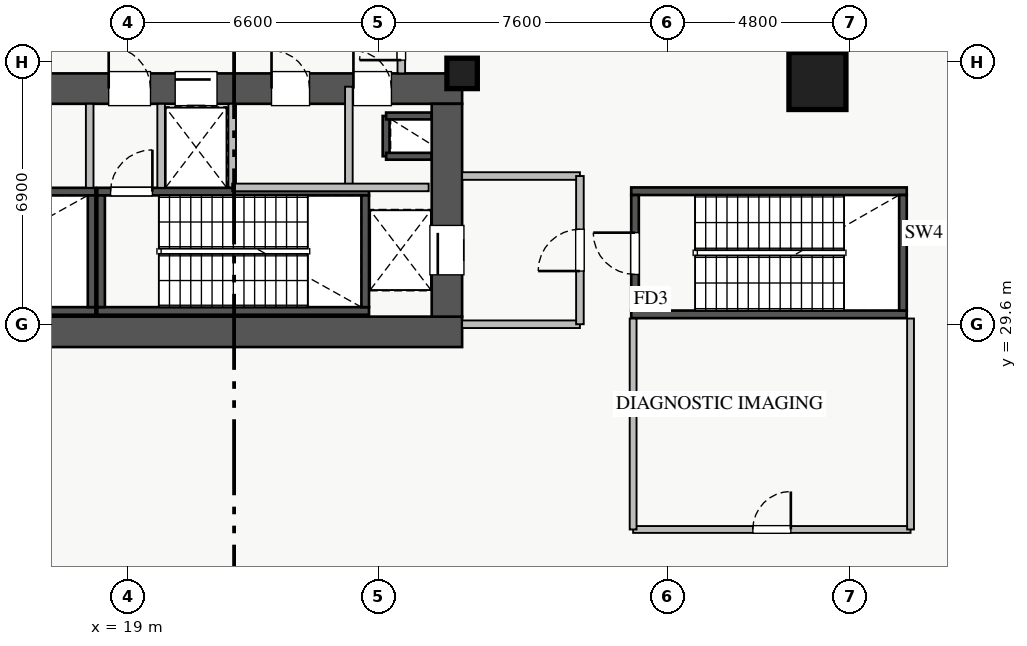
"""IFC4 building model, lengths in metres.
Left out: names, types, materials, properties, quantities, classifications, styles, units other than length and angle.
Written with IfcOpenShell. Run it as: python <this file> out.ifc"""

import sys

from ifc_helpers import new_model, si_unit, direction, frame, frame_2d, origin, origin_2d, place, context, subcontext, project, spatial, rectangle, extrude, source, transform, mapped, element, fill, save


model = new_model("IFC4")
c1 = context("Model", 3, precision=1e-05, world=origin(), true_north=direction((0.0, 1.0)))
c2 = subcontext(c1, "Body", "Model", "MODEL_VIEW")
j1 = project(units=[si_unit("LENGTHUNIT", "METRE"), si_unit("PLANEANGLEUNIT", "RADIAN")], contexts=[c1])
p1 = place(None, origin())
s1 = spatial("IfcSite", under=j1, at=p1, CompositionType="ELEMENT")
p2 = place(p1, origin())
s2 = spatial("IfcBuilding", under=s1, at=p2, CompositionType="ELEMENT")
p3 = place(p2, origin())
s3 = spatial("IfcBuildingStorey", under=s2, at=p3, CompositionType="ELEMENT", Elevation=0.0)
p4 = place(p3, frame((25.8, 34.02, 0.0), z_axis=(0.0, 0.0, 1.0), x_axis=(0.0, 1.0, 0.0)))
e1 = element("IfcWall", 1, at=p4, inside=s3, PredefinedType="SHEAR", context=c2, shape_type="SweptSolid", body=[
    extrude(rectangle(XDim=1.06, YDim=0.18, at=frame_2d((0.53, 0.0))), origin(), (0.0, 0.0, 1.0), 4.78),
])
for number, where, z_axis, x_axis in (
    (2, (25.8, 35.08, 0.0), (0.0, 0.0, 1.0), (1.0, 0.0, 0.0)),
    (3, (25.8, 34.02, 0.0), (0.0, 0.0, 1.0), (1.0, 0.0, 0.0)),
):
    element("IfcWall", number, at=place(p3, frame(where, z_axis=z_axis, x_axis=x_axis)), inside=s3, PredefinedType="SHEAR", context=c2, shape_type="SweptSolid", body=[
        extrude(rectangle(XDim=1.2, YDim=0.18, at=frame_2d((0.6, 0.0))), origin(), (0.0, 0.0, 1.0), 4.78),
    ])
p5 = place(p3, frame((19.88, 33.2, 0.0), z_axis=(0.0, 0.0, 1.0), x_axis=(1.0, 0.0, 0.0)))
e4 = element("IfcWall", 4, at=p5, inside=s3, PredefinedType="SHEAR", context=c2, shape_type="SweptSolid", body=[
    extrude(rectangle(XDim=1.87, YDim=0.18, at=frame_2d((0.935, 0.0))), origin(), (0.0, 0.0, 1.0), 4.78),
])
p6 = place(p3, frame((11.0, 29.95, 0.0), z_axis=(0.0, 0.0, 1.0), x_axis=(1.0, 0.0, 0.0)))
e5 = element("IfcWall", 5, at=p6, inside=s3, PredefinedType="SHEAR", context=c2, shape_type="SweptSolid", body=[
    extrude(rectangle(XDim=7.15, YDim=0.2, at=frame_2d((3.575, 0.0))), origin(), (0.0, 0.0, 1.0), 5.0),
])
p7 = place(p3, frame((11.0, 33.09, 0.0), z_axis=(0.0, 0.0, 1.0), x_axis=(1.0, 0.0, 0.0)))
e6 = element("IfcWall", 6, at=p7, inside=s3, PredefinedType="SHEAR", context=c2, shape_type="SweptSolid", body=[
    extrude(rectangle(XDim=7.15, YDim=0.2, at=frame_2d((3.575, 0.0))), origin(), (0.0, 0.0, 1.0), 5.0),
])
p8 = place(p7, frame((0.35, 0.0, 0.0)))
e7 = element("IfcOpeningElement", 7, at=p8, cuts=e6, PredefinedType="OPENING", context=c2, shape_type="SweptSolid", body=[
    extrude(rectangle(XDim=1.1, YDim=2.05, at=frame_2d((0.55, 1.025))), frame((0.0, 0.11, 0.0), z_axis=(0.0, -1.0, 0.0), x_axis=(1.0, 0.0, 0.0)), (0.0, 0.0, 1.0), 0.22),
])
p9 = place(p3, frame((18.05, 30.05, 0.0), z_axis=(0.0, 0.0, 1.0), x_axis=(0.0, 1.0, 0.0)))
e8 = element("IfcWall", 8, at=p9, inside=s3, PredefinedType="SHEAR", context=c2, shape_type="SweptSolid", body=[
    extrude(rectangle(XDim=2.94, YDim=0.2, at=frame_2d((1.47, 0.0))), origin(), (0.0, 0.0, 1.0), 5.0),
])
p10 = place(p3, frame((18.2, 29.95, 0.0), z_axis=(0.0, 0.0, 1.0), x_axis=(1.0, 0.0, 0.0)))
e9 = element("IfcWall", 9, at=p10, inside=s3, PredefinedType="SHEAR", context=c2, shape_type="SweptSolid", body=[
    extrude(rectangle(XDim=7.15, YDim=0.2, at=frame_2d((3.575, 0.0))), origin(), (0.0, 0.0, 1.0), 5.0),
])
p11 = place(p3, frame((18.2, 33.09, 0.0), z_axis=(0.0, 0.0, 1.0), x_axis=(1.0, 0.0, 0.0)))
e10 = element("IfcWall", 10, at=p11, inside=s3, PredefinedType="SHEAR", context=c2, shape_type="SweptSolid", body=[
    extrude(rectangle(XDim=7.15, YDim=0.2, at=frame_2d((3.575, 0.0))), origin(), (0.0, 0.0, 1.0), 5.0),
])
p12 = place(p11, frame((0.35, 0.0, 0.0)))
e11 = element("IfcOpeningElement", 11, at=p12, cuts=e10, PredefinedType="OPENING", context=c2, shape_type="SweptSolid", body=[
    extrude(rectangle(XDim=1.1, YDim=2.05, at=frame_2d((0.55, 1.025))), frame((0.0, 0.11, 0.0), z_axis=(0.0, -1.0, 0.0), x_axis=(1.0, 0.0, 0.0)), (0.0, 0.0, 1.0), 0.22),
])
for number, where, z_axis, x_axis in (
    (12, (18.3, 30.05, 0.0), (0.0, 0.0, 1.0), (0.0, 1.0, 0.0)),
    (13, (25.25, 30.05, 0.0), (0.0, 0.0, 1.0), (0.0, 1.0, 0.0)),
):
    element("IfcWall", number, at=place(p3, frame(where, z_axis=z_axis, x_axis=x_axis)), inside=s3, PredefinedType="SHEAR", context=c2, shape_type="SweptSolid", body=[
        extrude(rectangle(XDim=2.94, YDim=0.2, at=frame_2d((1.47, 0.0))), origin(), (0.0, 0.0, 1.0), 5.0),
    ])
for number, where, z_axis, x_axis in (
    (14, (32.25, 29.86, 0.0), (0.0, 0.0, 1.0), (1.0, 0.0, 0.0)),
    (15, (32.25, 33.1, 0.0), (0.0, 0.0, 1.0), (1.0, 0.0, 0.0)),
):
    element("IfcWall", number, at=place(p3, frame(where, z_axis=z_axis, x_axis=x_axis)), inside=s3, PredefinedType="SHEAR", context=c2, shape_type="SweptSolid", body=[
        extrude(rectangle(XDim=7.25, YDim=0.2, at=frame_2d((3.625, 0.0))), origin(), (0.0, 0.0, 1.0), 5.0),
    ])
p13 = place(p3, frame((32.35, 29.96, 0.0), z_axis=(0.0, 0.0, 1.0), x_axis=(0.0, 1.0, 0.0)))
e16 = element("IfcWall", 16, at=p13, inside=s3, PredefinedType="SHEAR", context=c2, shape_type="SweptSolid", body=[
    extrude(rectangle(XDim=3.04, YDim=0.2, at=frame_2d((1.52, 0.0))), origin(), (0.0, 0.0, 1.0), 5.0),
])
p14 = place(p13, frame((0.95, 0.0, 0.0)))
e17 = element("IfcOpeningElement", 17, at=p14, cuts=e16, PredefinedType="OPENING", context=c2, shape_type="SweptSolid", body=[
    extrude(rectangle(XDim=1.1, YDim=2.05, at=frame_2d((0.55, 1.025))), frame((0.0, 0.11, 0.0), z_axis=(0.0, -1.0, 0.0), x_axis=(1.0, 0.0, 0.0)), (0.0, 0.0, 1.0), 0.22),
])
p15 = place(p3, frame((39.4, 29.96, 0.0), z_axis=(0.0, 0.0, 1.0), x_axis=(0.0, 1.0, 0.0)))
e18 = element("IfcWall", 18, at=p15, inside=s3, PredefinedType="SHEAR", context=c2, shape_type="SweptSolid", body=[
    extrude(rectangle(XDim=3.04, YDim=0.2, at=frame_2d((1.52, 0.0))), origin(), (0.0, 0.0, 1.0), 5.0),
])
p16 = place(p3, frame((10.2, 29.4, 0.0), z_axis=(0.0, 0.0, 1.0), x_axis=(1.0, 0.0, 0.0)))
e19 = element("IfcWall", 19, at=p16, inside=s3, PredefinedType="SHEAR", context=c2, shape_type="SweptSolid", body=[
    extrude(rectangle(XDim=17.6, YDim=0.8, at=frame_2d((8.8, 0.0))), origin(), (0.0, 0.0, 1.0), 5.0),
])
p17 = place(p3, frame((10.2, 35.8, 0.0), z_axis=(0.0, 0.0, 1.0), x_axis=(1.0, 0.0, 0.0)))
e20 = element("IfcWall", 20, at=p17, inside=s3, PredefinedType="SHEAR", context=c2, shape_type="SweptSolid", body=[
    extrude(rectangle(XDim=17.6, YDim=0.8, at=frame_2d((8.8, 0.0))), origin(), (0.0, 0.0, 1.0), 5.0),
])
p18 = place(p17, frame((1.15, 0.0, 0.0)))
e21 = element("IfcOpeningElement", 21, at=p18, cuts=e20, PredefinedType="OPENING", context=c2, shape_type="SweptSolid", body=[
    extrude(rectangle(XDim=1.1, YDim=2.05, at=frame_2d((0.55, 1.025))), frame((0.0, 0.41, 0.0), z_axis=(0.0, -1.0, 0.0), x_axis=(1.0, 0.0, 0.0)), (0.0, 0.0, 1.0), 0.82),
])
p19 = place(p17, frame((8.3, 0.0, 0.0)))
e22 = element("IfcOpeningElement", 22, at=p19, cuts=e20, PredefinedType="OPENING", context=c2, shape_type="SweptSolid", body=[
    extrude(rectangle(XDim=1.1, YDim=2.05, at=frame_2d((0.55, 1.025))), frame((0.0, 0.41, 0.0), z_axis=(0.0, -1.0, 0.0), x_axis=(1.0, 0.0, 0.0)), (0.0, 0.0, 1.0), 0.82),
])
p20 = place(p17, frame((10.05, 0.0, 0.0)))
e23 = element("IfcOpeningElement", 23, at=p20, cuts=e20, PredefinedType="OPENING", context=c2, shape_type="SweptSolid", body=[
    extrude(rectangle(XDim=1.1, YDim=2.05, at=frame_2d((0.55, 1.025))), frame((0.0, 0.41, 0.0), z_axis=(0.0, -1.0, 0.0), x_axis=(1.0, 0.0, 0.0)), (0.0, 0.0, 1.0), 0.82),
])
p21 = place(p17, frame((4.9, 0.0, 0.0)))
e24 = element("IfcOpeningElement", 24, at=p21, cuts=e20, PredefinedType="OPENING", context=c2, shape_type="SweptSolid", body=[
    extrude(rectangle(XDim=1.1, YDim=2.05, at=frame_2d((0.55, 1.025))), frame((0.0, 0.41, 0.0), z_axis=(0.0, -1.0, 0.0), x_axis=(1.0, 0.0, 0.0)), (0.0, 0.0, 1.0), 0.82),
])
p22 = place(p17, frame((2.85, 0.0, 0.0)))
e25 = element("IfcOpeningElement", 25, at=p22, cuts=e20, PredefinedType="OPENING", context=c2, shape_type="SweptSolid", body=[
    extrude(rectangle(XDim=1.1, YDim=2.05, at=frame_2d((0.55, 1.025))), frame((0.0, 0.41, 0.0), z_axis=(0.0, -1.0, 0.0), x_axis=(1.0, 0.0, 0.0)), (0.0, 0.0, 1.0), 0.82),
])
p23 = place(p17, frame((14.74, 0.0, 0.0)))
e26 = element("IfcOpeningElement", 26, at=p23, cuts=e20, PredefinedType="OPENING", context=c2, shape_type="SweptSolid", body=[
    extrude(rectangle(XDim=1.0, YDim=2.05, at=frame_2d((0.5, 1.025))), frame((0.0, 0.41, 0.0), z_axis=(0.0, -1.0, 0.0), x_axis=(1.0, 0.0, 0.0)), (0.0, 0.0, 1.0), 0.82),
])
p24 = place(p17, frame((12.585, 0.0, 0.0)))
e27 = element("IfcOpeningElement", 27, at=p24, cuts=e20, PredefinedType="OPENING", context=c2, shape_type="SweptSolid", body=[
    extrude(rectangle(XDim=1.0, YDim=2.05, at=frame_2d((0.5, 1.025))), frame((0.0, 0.41, 0.0), z_axis=(0.0, -1.0, 0.0), x_axis=(1.0, 0.0, 0.0)), (0.0, 0.0, 1.0), 0.82),
])
p25 = place(p3, frame((27.4, 29.8, 0.0), z_axis=(0.0, 0.0, 1.0), x_axis=(0.0, 1.0, 0.0)))
e28 = element("IfcWall", 28, at=p25, inside=s3, PredefinedType="SHEAR", context=c2, shape_type="SweptSolid", body=[
    extrude(rectangle(XDim=5.6, YDim=0.8, at=frame_2d((2.8, 0.0))), origin(), (0.0, 0.0, 1.0), 5.0),
])
p26 = place(p25, frame((1.1, 0.0, 0.0)))
e29 = element("IfcOpeningElement", 29, at=p26, cuts=e28, PredefinedType="OPENING", context=c2, shape_type="SweptSolid", body=[
    extrude(rectangle(XDim=1.3, YDim=2.05, at=frame_2d((0.65, 1.025))), frame((0.0, 0.41, 0.0), z_axis=(0.0, -1.0, 0.0), x_axis=(1.0, 0.0, 0.0)), (0.0, 0.0, 1.0), 0.82),
])
m1 = source(origin(), c2, "Body", "SweptSolid", [
    extrude(rectangle(XDim=1.5, YDim=1.5, at=origin_2d()), origin(), (0.0, 0.0, 1.0), 5.0),
])
p27 = place(p3, frame((37.15, 36.0, 0.0), z_axis=(0.0, 0.0, 1.0), x_axis=(1.0, 0.0, 0.0)))
e30 = element("IfcColumn", 30, at=p27, inside=s3, PredefinedType="COLUMN", context=c2, shape_type="MappedRepresentation", body=[
    mapped(m1, transform((0.0, 0.0, 0.0), x_axis=(1.0, 0.0, 0.0), y_axis=(0.0, 1.0, 0.0), z_axis=(0.0, 0.0, 1.0), scale=1.0)),
])
m2 = source(origin(), c2, "Body", "SweptSolid", [
    extrude(rectangle(XDim=0.8, YDim=0.8, at=origin_2d()), origin(), (0.0, 0.0, 1.0), 5.0),
])
p28 = place(p3, frame((27.8, 36.2, 0.0), z_axis=(0.0, 0.0, 1.0), x_axis=(1.0, 0.0, 0.0)))
e31 = element("IfcColumn", 31, at=p28, inside=s3, PredefinedType="PILASTER", context=c2, shape_type="MappedRepresentation", body=[
    mapped(m2, transform((0.0, 0.0, 0.0), x_axis=(1.0, 0.0, 0.0), y_axis=(0.0, 1.0, 0.0), z_axis=(0.0, 0.0, 1.0), scale=1.0)),
])
p29 = place(p3, frame((27.8, 29.6, 0.0), z_axis=(0.0, 0.0, 1.0), x_axis=(1.0, 0.0, 0.0)))
e32 = element("IfcWall", 32, at=p29, inside=s3, PredefinedType="PARTITIONING", context=c2, shape_type="SweptSolid", body=[
    extrude(rectangle(XDim=3.1, YDim=0.2, at=frame_2d((1.55, 0.0))), origin(), (0.0, 0.0, 1.0), 4.075),
])
p30 = place(p3, frame((27.8, 33.5, 0.0), z_axis=(0.0, 0.0, 1.0), x_axis=(1.0, 0.0, 0.0)))
e33 = element("IfcWall", 33, at=p30, inside=s3, PredefinedType="PARTITIONING", context=c2, shape_type="SweptSolid", body=[
    extrude(rectangle(XDim=3.1, YDim=0.2, at=frame_2d((1.55, 0.0))), origin(), (0.0, 0.0, 1.0), 3.775),
])
p31 = place(p3, frame((30.9, 29.6, 0.0), z_axis=(0.0, 0.0, 1.0), x_axis=(0.0, 1.0, 0.0)))
e34 = element("IfcWall", 34, at=p31, inside=s3, PredefinedType="PARTITIONING", context=c2, shape_type="SweptSolid", body=[
    extrude(rectangle(XDim=3.9, YDim=0.2, at=frame_2d((1.95, 0.0))), origin(), (0.0, 0.0, 1.0), 4.78),
])
p32 = place(p31, frame((1.4, 0.0, 0.0)))
e35 = element("IfcOpeningElement", 35, at=p32, cuts=e34, PredefinedType="OPENING", context=c2, shape_type="SweptSolid", body=[
    extrude(rectangle(XDim=1.1, YDim=2.05, at=frame_2d((0.55, 1.025))), frame((0.0, 0.11, 0.0), z_axis=(0.0, -1.0, 0.0), x_axis=(1.0, 0.0, 0.0)), (0.0, 0.0, 1.0), 0.22),
])
for number, where, z_axis, x_axis in (
    (36, (18.0, 33.19, 0.0), (0.0, 0.0, 1.0), (0.0, 1.0, 0.0)),
    (37, (19.88, 33.19, 0.0), (0.0, 0.0, 1.0), (0.0, 1.0, 0.0)),
):
    element("IfcWall", number, at=place(p3, frame(where, z_axis=z_axis, x_axis=x_axis)), inside=s3, PredefinedType="PARTITIONING", context=c2, shape_type="SweptSolid", body=[
        extrude(rectangle(XDim=2.21, YDim=0.2, at=frame_2d((1.105, 0.0))), origin(), (0.0, 0.0, 1.0), 4.78),
    ])
p33 = place(p3, frame((24.82, 33.2, 0.0), z_axis=(0.0, 0.0, 1.0), x_axis=(0.0, 1.0, 0.0)))
e38 = element("IfcWall", 38, at=p33, inside=s3, PredefinedType="PARTITIONING", context=c2, shape_type="SweptSolid", body=[
    extrude(rectangle(XDim=2.65, YDim=0.2, at=frame_2d((1.325, 0.0))), origin(), (0.0, 0.0, 1.0), 4.78),
])
p34 = place(p3, frame((21.75, 33.2, 0.0), z_axis=(0.0, 0.0, 1.0), x_axis=(0.0, 1.0, 0.0)))
e39 = element("IfcWall", 39, at=p34, inside=s3, PredefinedType="PARTITIONING", context=c2, shape_type="SweptSolid", body=[
    extrude(rectangle(XDim=2.2, YDim=0.2, at=frame_2d((1.1, 0.0))), origin(), (0.0, 0.0, 1.0), 4.78),
])
p35 = place(p3, frame((21.75, 33.2, 0.0), z_axis=(0.0, 0.0, 1.0), x_axis=(1.0, 0.0, 0.0)))
e40 = element("IfcWall", 40, at=p35, inside=s3, PredefinedType="PARTITIONING", context=c2, shape_type="SweptSolid", body=[
    extrude(rectangle(XDim=5.17, YDim=0.2, at=frame_2d((2.585, 0.0))), origin(), (0.0, 0.0, 1.0), 4.78),
])
p36 = place(p3, frame((26.2, 36.2, 0.0), z_axis=(0.0, 0.0, 1.0), x_axis=(0.0, 1.0, 0.0)))
e41 = element("IfcWall", 41, at=p36, inside=s3, PredefinedType="PARTITIONING", context=c2, shape_type="SweptSolid", body=[
    extrude(rectangle(XDim=2.0, YDim=0.2, at=frame_2d((1.0, 0.0))), origin(), (0.0, 0.0, 1.0), 4.78),
])
p37 = place(p36, frame((0.35, 0.0, 0.0)))
e42 = element("IfcOpeningElement", 42, at=p37, cuts=e41, PredefinedType="OPENING", context=c2, shape_type="SweptSolid", body=[
    extrude(rectangle(XDim=1.1, YDim=2.05, at=frame_2d((0.55, 1.025))), frame((0.0, 0.11, 0.0), z_axis=(0.0, -1.0, 0.0), x_axis=(1.0, 0.0, 0.0)), (0.0, 0.0, 1.0), 0.22),
])
p38 = place(p3, frame((32.3, 24.2, 0.0), z_axis=(0.0, 0.0, 1.0), x_axis=(1.0, 0.0, 0.0)))
e43 = element("IfcWall", 43, at=p38, inside=s3, PredefinedType="PARTITIONING", context=c2, shape_type="SweptSolid", body=[
    extrude(rectangle(XDim=7.3, YDim=0.18, at=frame_2d((3.65, 0.0))), origin(), (0.0, 0.0, 1.0), 4.78),
])
p39 = place(p38, frame((3.15, 0.0, 0.0)))
e44 = element("IfcOpeningElement", 44, at=p39, cuts=e43, PredefinedType="OPENING", context=c2, shape_type="SweptSolid", body=[
    extrude(rectangle(XDim=1.0, YDim=2.05, at=frame_2d((0.5, 1.025))), frame((0.0, 0.1, 0.0), z_axis=(0.0, -1.0, 0.0), x_axis=(1.0, 0.0, 0.0)), (0.0, 0.0, 1.0), 0.2),
])
for number, where, z_axis, x_axis in (
    (45, (32.3, 24.2, 0.0), (0.0, 0.0, 1.0), (0.0, 1.0, 0.0)),
    (46, (39.6, 24.2, 0.0), (0.0, 0.0, 1.0), (0.0, 1.0, 0.0)),
):
    element("IfcWall", number, at=place(p3, frame(where, z_axis=z_axis, x_axis=x_axis)), inside=s3, PredefinedType="PARTITIONING", context=c2, shape_type="SweptSolid", body=[
        extrude(rectangle(XDim=5.55, YDim=0.18, at=frame_2d((2.775, 0.0))), origin(), (0.0, 0.0, 1.0), 4.78),
    ])
m3 = source(origin(), c2, "Body", "SweptSolid", [
    extrude(rectangle(XDim=1.3, YDim=2.05, at=frame_2d((0.65, 1.025))), frame((0.0, 0.025, 0.0), z_axis=(0.0, -1.0, 0.0), x_axis=(1.0, 0.0, 0.0)), (0.0, 0.0, 1.0), 0.05),
])
p40 = place(p26, origin())
e47 = element("IfcDoor", 47, at=p40, inside=s3, OperationType="SLIDING_TO_LEFT", PredefinedType="DOOR", context=c2, shape_type="MappedRepresentation", body=[
    mapped(m3, transform((0.0, 0.0, 0.0), x_axis=(1.0, 0.0, 0.0), y_axis=(0.0, 1.0, 0.0), z_axis=(0.0, 0.0, 1.0), scale=1.0)),
])
fill(e29, e47)
m4 = source(origin(), c2, "Body", "SweptSolid", [
    extrude(rectangle(XDim=1.1, YDim=2.05, at=frame_2d((0.55, 1.025))), frame((0.0, 0.025, 0.0), z_axis=(0.0, -1.0, 0.0), x_axis=(1.0, 0.0, 0.0)), (0.0, 0.0, 1.0), 0.05),
])
p41 = place(p19, origin())
e48 = element("IfcDoor", 48, at=p41, inside=s3, OperationType="SINGLE_SWING_LEFT", PredefinedType="DOOR", context=c2, shape_type="MappedRepresentation", body=[
    mapped(m4, transform((0.0, 0.0, 0.0), x_axis=(1.0, 0.0, 0.0), y_axis=(0.0, 1.0, 0.0), z_axis=(0.0, 0.0, 1.0), scale=1.0)),
])
fill(e22, e48)
p42 = place(p12, origin())
e49 = element("IfcDoor", 49, at=p42, inside=s3, OperationType="SINGLE_SWING_RIGHT", PredefinedType="DOOR", context=c2, shape_type="MappedRepresentation", body=[
    mapped(m4, transform((0.0, 0.0, 0.0), x_axis=(1.0, 0.0, 0.0), y_axis=(0.0, 1.0, 0.0), z_axis=(0.0, 0.0, 1.0), scale=1.0)),
])
fill(e11, e49)
p43 = place(p20, origin())
e50 = element("IfcDoor", 50, at=p43, inside=s3, OperationType="SLIDING_TO_LEFT", PredefinedType="DOOR", context=c2, shape_type="MappedRepresentation", body=[
    mapped(m4, transform((0.0, 0.0, 0.0), x_axis=(1.0, 0.0, 0.0), y_axis=(0.0, 1.0, 0.0), z_axis=(0.0, 0.0, 1.0), scale=1.0)),
])
fill(e23, e50)
m5 = source(origin(), c2, "Body", "SweptSolid", [
    extrude(rectangle(XDim=1.0, YDim=2.05, at=frame_2d((0.5, 1.025))), frame((0.0, 0.025, 0.0), z_axis=(0.0, -1.0, 0.0), x_axis=(1.0, 0.0, 0.0)), (0.0, 0.0, 1.0), 0.05),
])
p44 = place(p23, origin())
e51 = element("IfcDoor", 51, at=p44, inside=s3, OperationType="SINGLE_SWING_LEFT", PredefinedType="DOOR", context=c2, shape_type="MappedRepresentation", body=[
    mapped(m5, transform((0.0, 0.0, 0.0), x_axis=(1.0, 0.0, 0.0), y_axis=(0.0, 1.0, 0.0), z_axis=(0.0, 0.0, 1.0), scale=1.0)),
])
fill(e26, e51)
p45 = place(p24, origin())
e52 = element("IfcDoor", 52, at=p45, inside=s3, OperationType="SINGLE_SWING_LEFT", PredefinedType="DOOR", context=c2, shape_type="MappedRepresentation", body=[
    mapped(m5, transform((0.0, 0.0, 0.0), x_axis=(1.0, 0.0, 0.0), y_axis=(0.0, 1.0, 0.0), z_axis=(0.0, 0.0, 1.0), scale=1.0)),
])
fill(e27, e52)
p46 = place(p14, origin())
e53 = element("IfcDoor", 53, at=p46, inside=s3, OperationType="SINGLE_SWING_RIGHT", PredefinedType="DOOR", context=c2, shape_type="MappedRepresentation", body=[
    mapped(m4, transform((0.0, 0.0, 0.0), x_axis=(1.0, 0.0, 0.0), y_axis=(0.0, 1.0, 0.0), z_axis=(0.0, 0.0, 1.0), scale=1.0)),
])
fill(e17, e53)
p47 = place(p32, origin())
e54 = element("IfcDoor", 54, at=p47, inside=s3, OperationType="SINGLE_SWING_LEFT", PredefinedType="DOOR", context=c2, shape_type="MappedRepresentation", body=[
    mapped(m4, transform((0.0, 0.0, 0.0), x_axis=(1.0, 0.0, 0.0), y_axis=(0.0, 1.0, 0.0), z_axis=(0.0, 0.0, 1.0), scale=1.0)),
])
fill(e35, e54)
p48 = place(p37, origin())
e55 = element("IfcDoor", 55, at=p48, inside=s3, OperationType="SINGLE_SWING_LEFT", PredefinedType="DOOR", context=c2, shape_type="MappedRepresentation", body=[
    mapped(m4, transform((0.0, 0.0, 0.0), x_axis=(1.0, 0.0, 0.0), y_axis=(0.0, 1.0, 0.0), z_axis=(0.0, 0.0, 1.0), scale=1.0)),
])
fill(e42, e55)
p49 = place(p39, origin())
e56 = element("IfcDoor", 56, at=p49, inside=s3, OperationType="SINGLE_SWING_RIGHT", PredefinedType="DOOR", context=c2, shape_type="MappedRepresentation", body=[
    mapped(m5, transform((0.0, 0.0, 0.0), x_axis=(1.0, 0.0, 0.0), y_axis=(0.0, 1.0, 0.0), z_axis=(0.0, 0.0, 1.0), scale=1.0)),
])
fill(e44, e56)
save(model, sys.argv[1])
